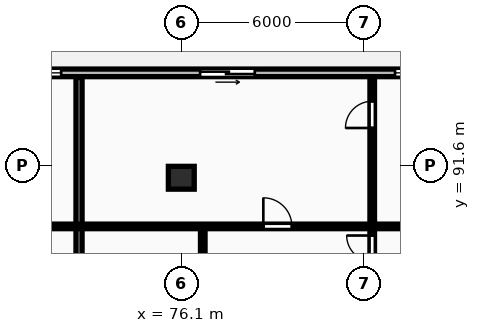
"""IFC4 building model, lengths in metres.
Left out: names, types, materials, properties, quantities, classifications, styles, units other than length and angle.
Written with IfcOpenShell. Run it as: python <this file> out.ifc"""

import sys

from ifc_helpers import new_model, si_unit, direction, frame, frame_2d, origin, origin_2d, place, context, subcontext, project, spatial, rectangle, extrude, element, fill, save


model = new_model("IFC4")
c1 = context("Model", 3, precision=1e-05, world=origin(), true_north=direction((0.0, 1.0)))
c2 = subcontext(c1, "Body", "Model", "MODEL_VIEW")
j1 = project(units=[si_unit("LENGTHUNIT", "METRE"), si_unit("PLANEANGLEUNIT", "RADIAN")], contexts=[c1])
p1 = place(None, origin())
s1 = spatial("IfcSite", under=j1, at=p1, CompositionType="ELEMENT")
p2 = place(p1, origin())
s2 = spatial("IfcBuilding", under=s1, at=p2, CompositionType="ELEMENT")
p3 = place(p2, frame((0.0, 0.0, 207.6)))
s3 = spatial("IfcBuildingStorey", under=s2, at=p3, CompositionType="ELEMENT", Elevation=207.6)
p4 = place(p3, frame((76.1, 91.2, 0.0), z_axis=(0.0, 0.0, 1.0), x_axis=(1.0, 0.0, 0.0)))
e1 = element("IfcColumn", 1, at=p4, inside=s3, PredefinedType="COLUMN", context=c2, shape_type="SweptSolid", body=[
    extrude(rectangle(XDim=0.85, YDim=0.75, at=origin_2d()), origin(), (0.0, 0.0, 1.0), 3.25),
])
p5 = place(p3, frame((128.4, 94.65, 0.0), z_axis=(0.0, 0.0, 1.0), x_axis=(-1.0, 0.0, 0.0)))
e2 = element("IfcWall", 2, at=p5, inside=s3, PredefinedType="STANDARD", context=c2, shape_type="SweptSolid", body=[
    extrude(rectangle(XDim=68.6, YDim=0.25, at=frame_2d((34.3, 0.0))), origin(), (0.0, 0.0, 1.0), 2.97),
])
p6 = place(p5, frame((62.6, 0.0, 0.0)))
e3 = element("IfcOpeningElement", 3, at=p6, cuts=e2, PredefinedType="OPENING", context=c2, shape_type="SweptSolid", body=[
    extrude(rectangle(XDim=1.8, YDim=2.2, at=frame_2d((0.9, 1.1))), frame((0.0, 0.135, 0.0), z_axis=(0.0, -1.0, 0.0), x_axis=(1.0, 0.0, 0.0)), (0.0, 0.0, 1.0), 0.27),
])
p7 = place(p5, frame((56.252, 0.0, 0.85)))
e4 = element("IfcOpeningElement", 4, at=p7, cuts=e2, PredefinedType="OPENING", context=c2, shape_type="SweptSolid", body=[
    extrude(rectangle(XDim=1.8, YDim=1.8, at=frame_2d((0.9, 0.9))), frame((0.0, 0.135, 0.0), z_axis=(0.0, -1.0, 0.0), x_axis=(1.0, 0.0, 0.0)), (0.0, 0.0, 1.0), 0.27),
])
p8 = place(p5, frame((49.882, 0.0, 0.0)))
e5 = element("IfcOpeningElement", 5, at=p8, cuts=e2, PredefinedType="OPENING", context=c2, shape_type="SweptSolid", body=[
    extrude(rectangle(XDim=1.8, YDim=2.2, at=frame_2d((0.9, 1.1))), frame((0.0, 0.135, 0.0), z_axis=(0.0, -1.0, 0.0), x_axis=(1.0, 0.0, 0.0)), (0.0, 0.0, 1.0), 0.27),
])
p9 = place(p5, frame((43.47, 0.0, 0.85)))
e6 = element("IfcOpeningElement", 6, at=p9, cuts=e2, PredefinedType="OPENING", context=c2, shape_type="SweptSolid", body=[
    extrude(rectangle(XDim=1.8, YDim=1.8, at=frame_2d((0.9, 0.9))), frame((0.0, 0.135, 0.0), z_axis=(0.0, -1.0, 0.0), x_axis=(1.0, 0.0, 0.0)), (0.0, 0.0, 1.0), 0.27),
])
p10 = place(p5, frame((36.75, 0.0, 0.0)))
e7 = element("IfcOpeningElement", 7, at=p10, cuts=e2, PredefinedType="OPENING", context=c2, shape_type="SweptSolid", body=[
    extrude(rectangle(XDim=1.8, YDim=2.2, at=frame_2d((0.9, 1.1))), frame((0.0, 0.135, 0.0), z_axis=(0.0, -1.0, 0.0), x_axis=(1.0, 0.0, 0.0)), (0.0, 0.0, 1.0), 0.27),
])
p11 = place(p5, frame((30.402, 0.0, 0.85)))
e8 = element("IfcOpeningElement", 8, at=p11, cuts=e2, PredefinedType="OPENING", context=c2, shape_type="SweptSolid", body=[
    extrude(rectangle(XDim=1.8, YDim=1.8, at=frame_2d((0.9, 0.9))), frame((0.0, 0.135, 0.0), z_axis=(0.0, -1.0, 0.0), x_axis=(1.0, 0.0, 0.0)), (0.0, 0.0, 1.0), 0.27),
])
p12 = place(p5, frame((23.882, 0.0, 0.0)))
e9 = element("IfcOpeningElement", 9, at=p12, cuts=e2, PredefinedType="OPENING", context=c2, shape_type="SweptSolid", body=[
    extrude(rectangle(XDim=1.8, YDim=2.2, at=frame_2d((0.9, 1.1))), frame((0.0, 0.135, 0.0), z_axis=(0.0, -1.0, 0.0), x_axis=(1.0, 0.0, 0.0)), (0.0, 0.0, 1.0), 0.27),
])
p13 = place(p5, frame((17.47, 0.0, 0.85)))
e10 = element("IfcOpeningElement", 10, at=p13, cuts=e2, PredefinedType="OPENING", context=c2, shape_type="SweptSolid", body=[
    extrude(rectangle(XDim=1.8, YDim=1.8, at=frame_2d((0.9, 0.9))), frame((0.0, 0.135, 0.0), z_axis=(0.0, -1.0, 0.0), x_axis=(1.0, 0.0, 0.0)), (0.0, 0.0, 1.0), 0.27),
])
p14 = place(p5, frame((9.48, 0.0, 0.85)))
e11 = element("IfcOpeningElement", 11, at=p14, cuts=e2, PredefinedType="OPENING", context=c2, shape_type="SweptSolid", body=[
    extrude(rectangle(XDim=1.8, YDim=1.8, at=frame_2d((0.9, 0.9))), frame((0.0, 0.135, 0.0), z_axis=(0.0, -1.0, 0.0), x_axis=(1.0, 0.0, 0.0)), (0.0, 0.0, 1.0), 0.27),
])
p15 = place(p5, frame((5.23, 0.0, 0.85)))
e12 = element("IfcOpeningElement", 12, at=p15, cuts=e2, PredefinedType="OPENING", context=c2, shape_type="SweptSolid", body=[
    extrude(rectangle(XDim=2.4, YDim=1.9, at=frame_2d((1.2, 0.95))), frame((0.0, 0.135, 0.0), z_axis=(0.0, -1.0, 0.0), x_axis=(1.0, 0.0, 0.0)), (0.0, 0.0, 1.0), 0.27),
])
p16 = place(p5, frame((13.455, 0.0, 0.0)))
e13 = element("IfcOpeningElement", 13, at=p16, cuts=e2, PredefinedType="OPENING", context=c2, shape_type="SweptSolid", body=[
    extrude(rectangle(XDim=1.8, YDim=2.2, at=frame_2d((0.9, 1.1))), frame((0.0, 0.135, 0.0), z_axis=(0.0, -1.0, 0.0), x_axis=(1.0, 0.0, 0.0)), (0.0, 0.0, 1.0), 0.27),
])
p17 = place(p5, frame((1.025, 0.0, 0.85)))
e14 = element("IfcOpeningElement", 14, at=p17, cuts=e2, PredefinedType="OPENING", context=c2, shape_type="SweptSolid", body=[
    extrude(rectangle(XDim=2.4, YDim=1.9, at=frame_2d((1.2, 0.95))), frame((0.0, 0.135, 0.0), z_axis=(0.0, -1.0, 0.0), x_axis=(1.0, 0.0, 0.0)), (0.0, 0.0, 1.0), 0.27),
])
p18 = place(p3, frame((72.736, 70.18, 0.0), z_axis=(0.0, 0.0, 1.0), x_axis=(0.0, 1.0, 0.0)))
e15 = element("IfcWall", 15, at=p18, inside=s3, PredefinedType="PARTITIONING", context=c2, shape_type="SweptSolid", body=[
    extrude(rectangle(XDim=24.32, YDim=0.2, at=frame_2d((12.16, 0.0))), origin(), (0.0, 0.0, 1.0), 2.97),
])
p19 = place(p3, frame((59.88, 89.6, 0.0), z_axis=(0.0, 0.0, 1.0), x_axis=(1.0, 0.0, 0.0)))
e16 = element("IfcWall", 16, at=p19, inside=s3, PredefinedType="PARTITIONING", context=c2, shape_type="SweptSolid", body=[
    extrude(rectangle(XDim=12.776, YDim=0.15, at=frame_2d((6.388, 0.0))), origin(), (0.0, 0.0, 1.0), 2.97),
])
p20 = place(p19, frame((5.557, 0.0, 0.0)))
e17 = element("IfcOpeningElement", 17, at=p20, cuts=e16, PredefinedType="OPENING", context=c2, shape_type="SweptSolid", body=[
    extrude(rectangle(XDim=0.94, YDim=2.1, at=frame_2d((0.47, 1.05))), frame((0.0, 0.085, 0.0), z_axis=(0.0, -1.0, 0.0), x_axis=(1.0, 0.0, 0.0)), (0.0, 0.0, 1.0), 0.17),
])
p21 = place(p3, frame((76.806, 84.54, 0.0), z_axis=(0.0, 0.0, 1.0), x_axis=(0.0, 1.0, 0.0)))
e18 = element("IfcWall", 18, at=p21, inside=s3, PredefinedType="PARTITIONING", context=c2, shape_type="SweptSolid", body=[
    extrude(rectangle(XDim=5.0, YDim=0.15, at=frame_2d((2.5, 0.0))), origin(), (0.0, 0.0, 1.0), 2.97),
])
p22 = place(p21, frame((2.06, 0.0, 0.0)))
e19 = element("IfcOpeningElement", 19, at=p22, cuts=e18, PredefinedType="OPENING", context=c2, shape_type="SweptSolid", body=[
    extrude(rectangle(XDim=0.88, YDim=2.06, at=frame_2d((0.44, 1.03))), frame((0.0, 0.085, 0.0), z_axis=(0.0, -1.0, 0.0), x_axis=(1.0, 0.0, 0.0)), (0.0, 0.0, 1.0), 0.17),
])
p23 = place(p3, frame((82.38, 84.54, 0.0), z_axis=(0.0, 0.0, 1.0), x_axis=(0.0, 1.0, 0.0)))
e20 = element("IfcWall", 20, at=p23, inside=s3, PredefinedType="PARTITIONING", context=c2, shape_type="SweptSolid", body=[
    extrude(rectangle(XDim=9.96, YDim=0.15, at=frame_2d((4.98, 0.0))), origin(), (0.0, 0.0, 1.0), 2.97),
])
p24 = place(p23, frame((1.43, 0.0, 0.0)))
e21 = element("IfcOpeningElement", 21, at=p24, cuts=e20, PredefinedType="OPENING", context=c2, shape_type="SweptSolid", body=[
    extrude(rectangle(XDim=0.84, YDim=2.04, at=frame_2d((0.42, 1.02))), frame((0.0, 0.085, 0.0), z_axis=(0.0, -1.0, 0.0), x_axis=(1.0, 0.0, 0.0)), (0.0, 0.0, 1.0), 0.17),
])
p25 = place(p23, frame((3.92, 0.0, 0.0)))
e22 = element("IfcOpeningElement", 22, at=p25, cuts=e20, PredefinedType="OPENING", context=c2, shape_type="SweptSolid", body=[
    extrude(rectangle(XDim=0.84, YDim=2.04, at=frame_2d((0.42, 1.02))), frame((0.0, 0.085, 0.0), z_axis=(0.0, -1.0, 0.0), x_axis=(1.0, 0.0, 0.0)), (0.0, 0.0, 1.0), 0.17),
])
p26 = place(p23, frame((8.297, 0.0, 0.0)))
e23 = element("IfcOpeningElement", 23, at=p26, cuts=e20, PredefinedType="OPENING", context=c2, shape_type="SweptSolid", body=[
    extrude(rectangle(XDim=0.88, YDim=2.06, at=frame_2d((0.44, 1.03))), frame((0.0, 0.085, 0.0), z_axis=(0.0, -1.0, 0.0), x_axis=(1.0, 0.0, 0.0)), (0.0, 0.0, 1.0), 0.17),
])
p27 = place(p3, frame((72.816, 89.6, 0.0), z_axis=(0.0, 0.0, 1.0), x_axis=(1.0, 0.0, 0.0)))
e24 = element("IfcWall", 24, at=p27, inside=s3, PredefinedType="PARTITIONING", context=c2, shape_type="SweptSolid", body=[
    extrude(rectangle(XDim=12.904, YDim=0.15, at=frame_2d((6.452, 0.0))), origin(), (0.0, 0.0, 1.0), 2.97),
])
p28 = place(p27, frame((5.982, 0.0, 0.0)))
e25 = element("IfcOpeningElement", 25, at=p28, cuts=e24, PredefinedType="OPENING", context=c2, shape_type="SweptSolid", body=[
    extrude(rectangle(XDim=0.94, YDim=2.1, at=frame_2d((0.47, 1.05))), frame((0.0, 0.085, 0.0), z_axis=(0.0, -1.0, 0.0), x_axis=(1.0, 0.0, 0.0)), (0.0, 0.0, 1.0), 0.17),
])
p29 = place(p7, origin())
e26 = element("IfcWindow", 26, at=p29, inside=s3, PartitioningType="SINGLE_PANEL", PredefinedType="WINDOW", context=c2, shape_type="SweptSolid", body=[
    extrude(rectangle(XDim=1.8, YDim=1.8, at=frame_2d((0.9, 0.9))), frame((0.0, 0.03, 0.0), z_axis=(0.0, -1.0, 0.0), x_axis=(1.0, 0.0, 0.0)), (0.0, 0.0, 1.0), 0.06),
])
fill(e4, e26)
p30 = place(p8, origin())
e27 = element("IfcDoor", 27, at=p30, inside=s3, OperationType="SLIDING_TO_LEFT", PredefinedType="DOOR", context=c2, shape_type="SweptSolid", body=[
    extrude(rectangle(XDim=1.8, YDim=2.2, at=frame_2d((0.9, 1.1))), frame((0.0, 0.025, 0.0), z_axis=(0.0, -1.0, 0.0), x_axis=(1.0, 0.0, 0.0)), (0.0, 0.0, 1.0), 0.05),
])
fill(e5, e27)
p31 = place(p9, origin())
e28 = element("IfcWindow", 28, at=p31, inside=s3, PartitioningType="SINGLE_PANEL", PredefinedType="WINDOW", context=c2, shape_type="SweptSolid", body=[
    extrude(rectangle(XDim=1.8, YDim=1.8, at=frame_2d((0.9, 0.9))), frame((0.0, 0.03, 0.0), z_axis=(0.0, -1.0, 0.0), x_axis=(1.0, 0.0, 0.0)), (0.0, 0.0, 1.0), 0.06),
])
fill(e6, e28)
p32 = place(p25, origin())
e29 = element("IfcDoor", 29, at=p32, inside=s3, OperationType="SINGLE_SWING_RIGHT", PredefinedType="DOOR", context=c2, shape_type="SweptSolid", body=[
    extrude(rectangle(XDim=0.84, YDim=2.04, at=frame_2d((0.42, 1.02))), frame((0.0, 0.025, 0.0), z_axis=(0.0, -1.0, 0.0), x_axis=(1.0, 0.0, 0.0)), (0.0, 0.0, 1.0), 0.05),
])
fill(e22, e29)
p33 = place(p26, origin())
e30 = element("IfcDoor", 30, at=p33, inside=s3, OperationType="SINGLE_SWING_LEFT", PredefinedType="DOOR", context=c2, shape_type="SweptSolid", body=[
    extrude(rectangle(XDim=0.88, YDim=2.06, at=frame_2d((0.44, 1.03))), frame((0.0, 0.025, 0.0), z_axis=(0.0, -1.0, 0.0), x_axis=(1.0, 0.0, 0.0)), (0.0, 0.0, 1.0), 0.05),
])
fill(e23, e30)
p34 = place(p28, origin())
e31 = element("IfcDoor", 31, at=p34, inside=s3, OperationType="SINGLE_SWING_LEFT", PredefinedType="DOOR", context=c2, shape_type="SweptSolid", body=[
    extrude(rectangle(XDim=0.94, YDim=2.1, at=frame_2d((0.47, 1.05))), frame((0.0, 0.025, 0.0), z_axis=(0.0, -1.0, 0.0), x_axis=(1.0, 0.0, 0.0)), (0.0, 0.0, 1.0), 0.05),
])
fill(e25, e31)
save(model, sys.argv[1])
